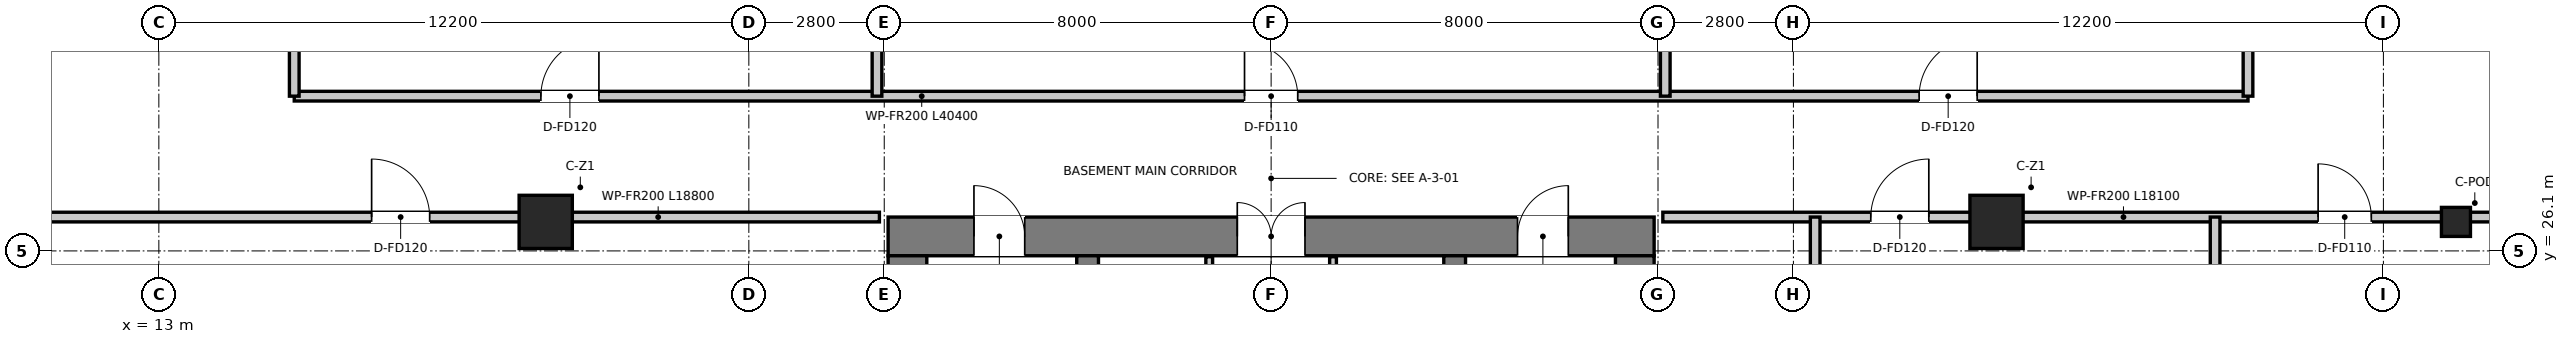
"""IFC4 building model, lengths in metres.
Left out: names, types, materials, properties, quantities, classifications, styles, units other than length and angle.
Written with IfcOpenShell. Run it as: python <this file> out.ifc"""

import sys

from ifc_helpers import new_model, si_unit, direction, frame, frame_2d, origin, origin_2d, place, context, subcontext, project, spatial, rectangle, extrude, source, transform, mapped, element, fill, save


model = new_model("IFC4")
c1 = context("Model", 3, precision=1e-05, world=origin(), true_north=direction((0.0, 1.0)))
c2 = subcontext(c1, "Body", "Model", "MODEL_VIEW")
j1 = project(units=[si_unit("LENGTHUNIT", "METRE"), si_unit("PLANEANGLEUNIT", "RADIAN")], contexts=[c1])
p1 = place(None, origin())
s1 = spatial("IfcSite", under=j1, at=p1, CompositionType="ELEMENT")
p2 = place(p1, origin())
s2 = spatial("IfcBuilding", under=s1, at=p2, CompositionType="ELEMENT")
p3 = place(p2, frame((0.0, 0.0, -4.8)))
s3 = spatial("IfcBuildingStorey", under=s2, at=p3, CompositionType="ELEMENT", Elevation=-4.8)
p4 = place(p3, frame((28.08, 26.4, 0.0), z_axis=(0.0, 0.0, 1.0), x_axis=(1.0, 0.0, 0.0)))
e1 = element("IfcWall", 1, at=p4, inside=s3, PredefinedType="SHEAR", context=c2, shape_type="SweptSolid", body=[
    extrude(rectangle(XDim=15.84, YDim=0.8, at=frame_2d((7.92, 0.0))), origin(), (0.0, 0.0, 1.0), 4.8),
])
p5 = place(p4, frame((7.22, 0.0, 0.0)))
e2 = element("IfcOpeningElement", 2, at=p5, cuts=e1, PredefinedType="OPENING", context=c2, shape_type="SweptSolid", body=[
    extrude(rectangle(XDim=1.4, YDim=2.2, at=frame_2d((0.7, 1.1))), frame((0.0, 0.41, 0.0), z_axis=(0.0, -1.0, 0.0), x_axis=(1.0, 0.0, 0.0)), (0.0, 0.0, 1.0), 0.82),
])
p6 = place(p4, frame((1.775, 0.0, 0.0)))
e3 = element("IfcOpeningElement", 3, at=p6, cuts=e1, PredefinedType="OPENING", context=c2, shape_type="SweptSolid", body=[
    extrude(rectangle(XDim=1.05, YDim=2.1, at=frame_2d((0.525, 1.05))), frame((0.0, 0.41, 0.0), z_axis=(0.0, -1.0, 0.0), x_axis=(1.0, 0.0, 0.0)), (0.0, 0.0, 1.0), 0.82),
])
p7 = place(p4, frame((13.015, 0.0, 0.0)))
e4 = element("IfcOpeningElement", 4, at=p7, cuts=e1, PredefinedType="OPENING", context=c2, shape_type="SweptSolid", body=[
    extrude(rectangle(XDim=1.05, YDim=2.1, at=frame_2d((0.525, 1.05))), frame((0.0, 0.41, 0.0), z_axis=(0.0, -1.0, 0.0), x_axis=(1.0, 0.0, 0.0)), (0.0, 0.0, 1.0), 0.82),
])
for number, where, z_axis, x_axis in (
    (5, (28.48, 11.3, 0.0), (0.0, 0.0, 1.0), (0.0, 1.0, 0.0)),
    (6, (43.52, 11.3, 0.0), (0.0, 0.0, 1.0), (0.0, 1.0, 0.0)),
):
    element("IfcWall", number, at=place(p3, frame(where, z_axis=z_axis, x_axis=x_axis)), inside=s3, PredefinedType="SHEAR", context=c2, shape_type="SweptSolid", body=[
        extrude(rectangle(XDim=14.7, YDim=0.8, at=frame_2d((7.35, 0.0))), origin(), (0.0, 0.0, 1.0), 4.8),
    ])
p8 = place(p3, frame((32.205, 13.22, 0.0), z_axis=(0.0, 0.0, 1.0), x_axis=(0.0, 1.0, 0.0)))
e7 = element("IfcWall", 7, at=p8, inside=s3, PredefinedType="SHEAR", context=c2, shape_type="SweptSolid", body=[
    extrude(rectangle(XDim=12.78, YDim=0.45, at=frame_2d((6.39, 0.0))), origin(), (0.0, 0.0, 1.0), 4.8),
])
p9 = place(p8, frame((10.58, 0.0, 0.0)))
e8 = element("IfcOpeningElement", 8, at=p9, cuts=e7, PredefinedType="OPENING", context=c2, shape_type="SweptSolid", body=[
    extrude(rectangle(XDim=1.1, YDim=2.15, at=frame_2d((0.55, 1.075))), frame((0.0, 0.235, 0.0), z_axis=(0.0, -1.0, 0.0), x_axis=(1.0, 0.0, 0.0)), (0.0, 0.0, 1.0), 0.47),
])
p10 = place(p3, frame((39.795, 13.22, 0.0), z_axis=(0.0, 0.0, 1.0), x_axis=(0.0, 1.0, 0.0)))
e9 = element("IfcWall", 9, at=p10, inside=s3, PredefinedType="SHEAR", context=c2, shape_type="SweptSolid", body=[
    extrude(rectangle(XDim=12.78, YDim=0.45, at=frame_2d((6.39, 0.0))), origin(), (0.0, 0.0, 1.0), 4.8),
])
p11 = place(p10, frame((10.58, 0.0, 0.0)))
e10 = element("IfcOpeningElement", 10, at=p11, cuts=e9, PredefinedType="OPENING", context=c2, shape_type="SweptSolid", body=[
    extrude(rectangle(XDim=1.1, YDim=2.15, at=frame_2d((0.55, 1.075))), frame((0.0, 0.235, 0.0), z_axis=(0.0, -1.0, 0.0), x_axis=(1.0, 0.0, 0.0)), (0.0, 0.0, 1.0), 0.47),
])
m1 = source(origin(), c2, "Body", "SweptSolid", [
    extrude(rectangle(XDim=1.1, YDim=1.1, at=origin_2d()), origin(), (0.0, 0.0, 1.0), 4.8),
])
for number, where, z_axis, x_axis in (
    (11, (21.0, 26.7, 0.0), (0.0, 0.0, 1.0), (1.0, 0.0, 0.0)),
    (12, (51.0, 26.7, 0.0), (0.0, 0.0, 1.0), (1.0, 0.0, 0.0)),
):
    element("IfcColumn", number, at=place(p3, frame(where, z_axis=z_axis, x_axis=x_axis)), inside=s3, PredefinedType="COLUMN", context=c2, shape_type="MappedRepresentation", body=[
        mapped(m1, transform((0.0, 0.0, 0.0), x_axis=(1.0, 0.0, 0.0), y_axis=(0.0, 1.0, 0.0), z_axis=(0.0, 0.0, 1.0), scale=1.0)),
    ])
m2 = source(origin(), c2, "Body", "SweptSolid", [
    extrude(rectangle(XDim=0.6, YDim=0.6, at=origin_2d()), origin(), (0.0, 0.0, 1.0), 4.8),
])
p12 = place(p3, frame((60.5, 26.7, 0.0), z_axis=(0.0, 0.0, 1.0), x_axis=(1.0, 0.0, 0.0)))
e13 = element("IfcColumn", 13, at=p12, inside=s3, PredefinedType="COLUMN", context=c2, shape_type="MappedRepresentation", body=[
    mapped(m2, transform((0.0, 0.0, 0.0), x_axis=(1.0, 0.0, 0.0), y_axis=(0.0, 1.0, 0.0), z_axis=(0.0, 0.0, 1.0), scale=1.0)),
])
p13 = place(p3, frame((34.72, 20.2, 0.0), z_axis=(0.0, 0.0, 1.0), x_axis=(0.0, 1.0, 0.0)))
e14 = element("IfcWall", 14, at=p13, inside=s3, PredefinedType="PARTITIONING", context=c2, shape_type="SweptSolid", body=[
    extrude(rectangle(XDim=5.78, YDim=0.14, at=frame_2d((2.89, 0.0))), origin(), (0.0, 0.0, 1.0), 3.25),
])
p14 = place(p13, frame((1.05, 0.0, 0.0)))
e15 = element("IfcOpeningElement", 15, at=p14, cuts=e14, PredefinedType="OPENING", context=c2, shape_type="SweptSolid", body=[
    extrude(rectangle(XDim=0.9, YDim=2.1, at=frame_2d((0.45, 1.05))), frame((0.0, 0.08, 0.0), z_axis=(0.0, -1.0, 0.0), x_axis=(1.0, 0.0, 0.0)), (0.0, 0.0, 1.0), 0.16),
])
p15 = place(p3, frame((37.28, 20.2, 0.0), z_axis=(0.0, 0.0, 1.0), x_axis=(0.0, 1.0, 0.0)))
e16 = element("IfcWall", 16, at=p15, inside=s3, PredefinedType="PARTITIONING", context=c2, shape_type="SweptSolid", body=[
    extrude(rectangle(XDim=5.78, YDim=0.14, at=frame_2d((2.89, 0.0))), origin(), (0.0, 0.0, 1.0), 3.25),
])
p16 = place(p15, frame((0.95, 0.0, 0.0)))
e17 = element("IfcOpeningElement", 17, at=p16, cuts=e16, PredefinedType="OPENING", context=c2, shape_type="SweptSolid", body=[
    extrude(rectangle(XDim=1.1, YDim=2.15, at=frame_2d((0.55, 1.075))), frame((0.0, 0.08, 0.0), z_axis=(0.0, -1.0, 0.0), x_axis=(1.0, 0.0, 0.0)), (0.0, 0.0, 1.0), 0.16),
])
p17 = place(p3, frame((15.8, 29.3, 0.0), z_axis=(0.0, 0.0, 1.0), x_axis=(1.0, 0.0, 0.0)))
e18 = element("IfcWall", 18, at=p17, inside=s3, PredefinedType="PARTITIONING", context=c2, shape_type="SweptSolid", body=[
    extrude(rectangle(XDim=40.4, YDim=0.2, at=frame_2d((20.2, 0.0))), origin(), (0.0, 0.0, 1.0), 3.65),
])
p18 = place(p17, frame((5.1, 0.0, 0.0)))
e19 = element("IfcOpeningElement", 19, at=p18, cuts=e18, PredefinedType="OPENING", context=c2, shape_type="SweptSolid", body=[
    extrude(rectangle(XDim=1.2, YDim=2.15, at=frame_2d((0.6, 1.075))), frame((0.0, 0.11, 0.0), z_axis=(0.0, -1.0, 0.0), x_axis=(1.0, 0.0, 0.0)), (0.0, 0.0, 1.0), 0.22),
])
p19 = place(p17, frame((19.65, 0.0, 0.0)))
e20 = element("IfcOpeningElement", 20, at=p19, cuts=e18, PredefinedType="OPENING", context=c2, shape_type="SweptSolid", body=[
    extrude(rectangle(XDim=1.1, YDim=2.15, at=frame_2d((0.55, 1.075))), frame((0.0, 0.11, 0.0), z_axis=(0.0, -1.0, 0.0), x_axis=(1.0, 0.0, 0.0)), (0.0, 0.0, 1.0), 0.22),
])
p20 = place(p17, frame((33.6, 0.0, 0.0)))
e21 = element("IfcOpeningElement", 21, at=p20, cuts=e18, PredefinedType="OPENING", context=c2, shape_type="SweptSolid", body=[
    extrude(rectangle(XDim=1.2, YDim=2.15, at=frame_2d((0.6, 1.075))), frame((0.0, 0.11, 0.0), z_axis=(0.0, -1.0, 0.0), x_axis=(1.0, 0.0, 0.0)), (0.0, 0.0, 1.0), 0.22),
])
p21 = place(p3, frame((9.1, 26.8, 0.0), z_axis=(0.0, 0.0, 1.0), x_axis=(1.0, 0.0, 0.0)))
e22 = element("IfcWall", 22, at=p21, inside=s3, PredefinedType="PARTITIONING", context=c2, shape_type="SweptSolid", body=[
    extrude(rectangle(XDim=18.8, YDim=0.2, at=frame_2d((9.4, 0.0))), origin(), (0.0, 0.0, 1.0), 2.65),
])
p22 = place(p21, frame((8.3, 0.0, 0.0)))
e23 = element("IfcOpeningElement", 23, at=p22, cuts=e22, PredefinedType="OPENING", context=c2, shape_type="SweptSolid", body=[
    extrude(rectangle(XDim=1.2, YDim=2.15, at=frame_2d((0.6, 1.075))), frame((0.0, 0.11, 0.0), z_axis=(0.0, -1.0, 0.0), x_axis=(1.0, 0.0, 0.0)), (0.0, 0.0, 1.0), 0.22),
])
p23 = place(p3, frame((44.1, 26.8, 0.0), z_axis=(0.0, 0.0, 1.0), x_axis=(1.0, 0.0, 0.0)))
e24 = element("IfcWall", 24, at=p23, inside=s3, PredefinedType="PARTITIONING", context=c2, shape_type="SweptSolid", body=[
    extrude(rectangle(XDim=18.1, YDim=0.2, at=frame_2d((9.05, 0.0))), origin(), (0.0, 0.0, 1.0), 3.65),
])
p24 = place(p23, frame((4.3, 0.0, 0.0)))
e25 = element("IfcOpeningElement", 25, at=p24, cuts=e24, PredefinedType="OPENING", context=c2, shape_type="SweptSolid", body=[
    extrude(rectangle(XDim=1.2, YDim=2.15, at=frame_2d((0.6, 1.075))), frame((0.0, 0.11, 0.0), z_axis=(0.0, -1.0, 0.0), x_axis=(1.0, 0.0, 0.0)), (0.0, 0.0, 1.0), 0.22),
])
p25 = place(p23, frame((13.55, 0.0, 0.0)))
e26 = element("IfcOpeningElement", 26, at=p25, cuts=e24, PredefinedType="OPENING", context=c2, shape_type="SweptSolid", body=[
    extrude(rectangle(XDim=1.1, YDim=2.15, at=frame_2d((0.55, 1.075))), frame((0.0, 0.11, 0.0), z_axis=(0.0, -1.0, 0.0), x_axis=(1.0, 0.0, 0.0)), (0.0, 0.0, 1.0), 0.22),
])
p26 = place(p3, frame((15.8, 29.3, 0.0), z_axis=(0.0, 0.0, 1.0), x_axis=(0.0, 1.0, 0.0)))
e27 = element("IfcWall", 27, at=p26, inside=s3, PredefinedType="PARTITIONING", context=c2, shape_type="SweptSolid", body=[
    extrude(rectangle(XDim=20.5, YDim=0.2, at=frame_2d((10.25, 0.0))), origin(), (0.0, 0.0, 1.0), 3.45),
])
p27 = place(p3, frame((56.2, 29.3, 0.0), z_axis=(0.0, 0.0, 1.0), x_axis=(0.0, 1.0, 0.0)))
e28 = element("IfcWall", 28, at=p27, inside=s3, PredefinedType="PARTITIONING", context=c2, shape_type="SweptSolid", body=[
    extrude(rectangle(XDim=20.5, YDim=0.2, at=frame_2d((10.25, 0.0))), origin(), (0.0, 0.0, 1.0), 3.81),
])
for number, where, z_axis, x_axis in (
    (29, (27.85, 29.3, 0.0), (0.0, 0.0, 1.0), (0.0, 1.0, 0.0)),
    (30, (44.15, 29.3, 0.0), (0.0, 0.0, 1.0), (0.0, 1.0, 0.0)),
):
    element("IfcWall", number, at=place(p3, frame(where, z_axis=z_axis, x_axis=x_axis)), inside=s3, PredefinedType="PARTITIONING", context=c2, shape_type="SweptSolid", body=[
        extrude(rectangle(XDim=23.2, YDim=0.2, at=frame_2d((11.6, 0.0))), origin(), (0.0, 0.0, 1.0), 3.65),
    ])
p28 = place(p3, frame((47.25, 17.32, 0.0), z_axis=(0.0, 0.0, 1.0), x_axis=(0.0, 1.0, 0.0)))
e31 = element("IfcWall", 31, at=p28, inside=s3, PredefinedType="PARTITIONING", context=c2, shape_type="SweptSolid", body=[
    extrude(rectangle(XDim=9.48, YDim=0.2, at=frame_2d((4.74, 0.0))), origin(), (0.0, 0.0, 1.0), 4.45),
])
p29 = place(p3, frame((55.52, 17.32, 0.0), z_axis=(0.0, 0.0, 1.0), x_axis=(0.0, 1.0, 0.0)))
e32 = element("IfcWall", 32, at=p29, inside=s3, PredefinedType="PARTITIONING", context=c2, shape_type="SweptSolid", body=[
    extrude(rectangle(XDim=9.48, YDim=0.2, at=frame_2d((4.74, 0.0))), origin(), (0.0, 0.0, 1.0), 3.81),
])
p30 = place(p5, origin())
e33 = element("IfcDoor", 33, at=p30, inside=s3, OperationType="DOUBLE_DOOR_SINGLE_SWING", PredefinedType="DOOR", context=c2, shape_type="SweptSolid", body=[
    extrude(rectangle(XDim=1.4, YDim=2.2, at=frame_2d((0.7, 1.1))), frame((0.0, 0.025, 0.0), z_axis=(0.0, -1.0, 0.0), x_axis=(1.0, 0.0, 0.0)), (0.0, 0.0, 1.0), 0.05),
])
fill(e2, e33)
p31 = place(p6, origin())
e34 = element("IfcDoor", 34, at=p31, inside=s3, OperationType="SINGLE_SWING_LEFT", PredefinedType="DOOR", context=c2, shape_type="SweptSolid", body=[
    extrude(rectangle(XDim=1.05, YDim=2.1, at=frame_2d((0.525, 1.05))), frame((0.0, 0.025, 0.0), z_axis=(0.0, -1.0, 0.0), x_axis=(1.0, 0.0, 0.0)), (0.0, 0.0, 1.0), 0.05),
])
fill(e3, e34)
p32 = place(p7, origin())
e35 = element("IfcDoor", 35, at=p32, inside=s3, OperationType="SINGLE_SWING_RIGHT", PredefinedType="DOOR", context=c2, shape_type="SweptSolid", body=[
    extrude(rectangle(XDim=1.05, YDim=2.1, at=frame_2d((0.525, 1.05))), frame((0.0, 0.025, 0.0), z_axis=(0.0, -1.0, 0.0), x_axis=(1.0, 0.0, 0.0)), (0.0, 0.0, 1.0), 0.05),
])
fill(e4, e35)
p33 = place(p22, origin())
e36 = element("IfcDoor", 36, at=p33, inside=s3, OperationType="SINGLE_SWING_LEFT", PredefinedType="DOOR", context=c2, shape_type="SweptSolid", body=[
    extrude(rectangle(XDim=1.2, YDim=2.15, at=frame_2d((0.6, 1.075))), frame((0.0, 0.025, 0.0), z_axis=(0.0, -1.0, 0.0), x_axis=(1.0, 0.0, 0.0)), (0.0, 0.0, 1.0), 0.05),
])
fill(e23, e36)
p34 = place(p24, origin())
e37 = element("IfcDoor", 37, at=p34, inside=s3, OperationType="SINGLE_SWING_RIGHT", PredefinedType="DOOR", context=c2, shape_type="SweptSolid", body=[
    extrude(rectangle(XDim=1.2, YDim=2.15, at=frame_2d((0.6, 1.075))), frame((0.0, 0.025, 0.0), z_axis=(0.0, -1.0, 0.0), x_axis=(1.0, 0.0, 0.0)), (0.0, 0.0, 1.0), 0.05),
])
fill(e25, e37)
p35 = place(p25, origin())
e38 = element("IfcDoor", 38, at=p35, inside=s3, OperationType="SINGLE_SWING_LEFT", PredefinedType="DOOR", context=c2, shape_type="SweptSolid", body=[
    extrude(rectangle(XDim=1.1, YDim=2.15, at=frame_2d((0.55, 1.075))), frame((0.0, 0.025, 0.0), z_axis=(0.0, -1.0, 0.0), x_axis=(1.0, 0.0, 0.0)), (0.0, 0.0, 1.0), 0.05),
])
fill(e26, e38)
p36 = place(p18, origin())
e39 = element("IfcDoor", 39, at=p36, inside=s3, OperationType="SINGLE_SWING_RIGHT", PredefinedType="DOOR", context=c2, shape_type="SweptSolid", body=[
    extrude(rectangle(XDim=1.2, YDim=2.15, at=frame_2d((0.6, 1.075))), frame((0.0, 0.025, 0.0), z_axis=(0.0, -1.0, 0.0), x_axis=(1.0, 0.0, 0.0)), (0.0, 0.0, 1.0), 0.05),
])
fill(e19, e39)
p37 = place(p19, origin())
e40 = element("IfcDoor", 40, at=p37, inside=s3, OperationType="SINGLE_SWING_LEFT", PredefinedType="DOOR", context=c2, shape_type="SweptSolid", body=[
    extrude(rectangle(XDim=1.1, YDim=2.15, at=frame_2d((0.55, 1.075))), frame((0.0, 0.025, 0.0), z_axis=(0.0, -1.0, 0.0), x_axis=(1.0, 0.0, 0.0)), (0.0, 0.0, 1.0), 0.05),
])
fill(e20, e40)
p38 = place(p20, origin())
e41 = element("IfcDoor", 41, at=p38, inside=s3, OperationType="SINGLE_SWING_RIGHT", PredefinedType="DOOR", context=c2, shape_type="SweptSolid", body=[
    extrude(rectangle(XDim=1.2, YDim=2.15, at=frame_2d((0.6, 1.075))), frame((0.0, 0.025, 0.0), z_axis=(0.0, -1.0, 0.0), x_axis=(1.0, 0.0, 0.0)), (0.0, 0.0, 1.0), 0.05),
])
fill(e21, e41)
save(model, sys.argv[1])
